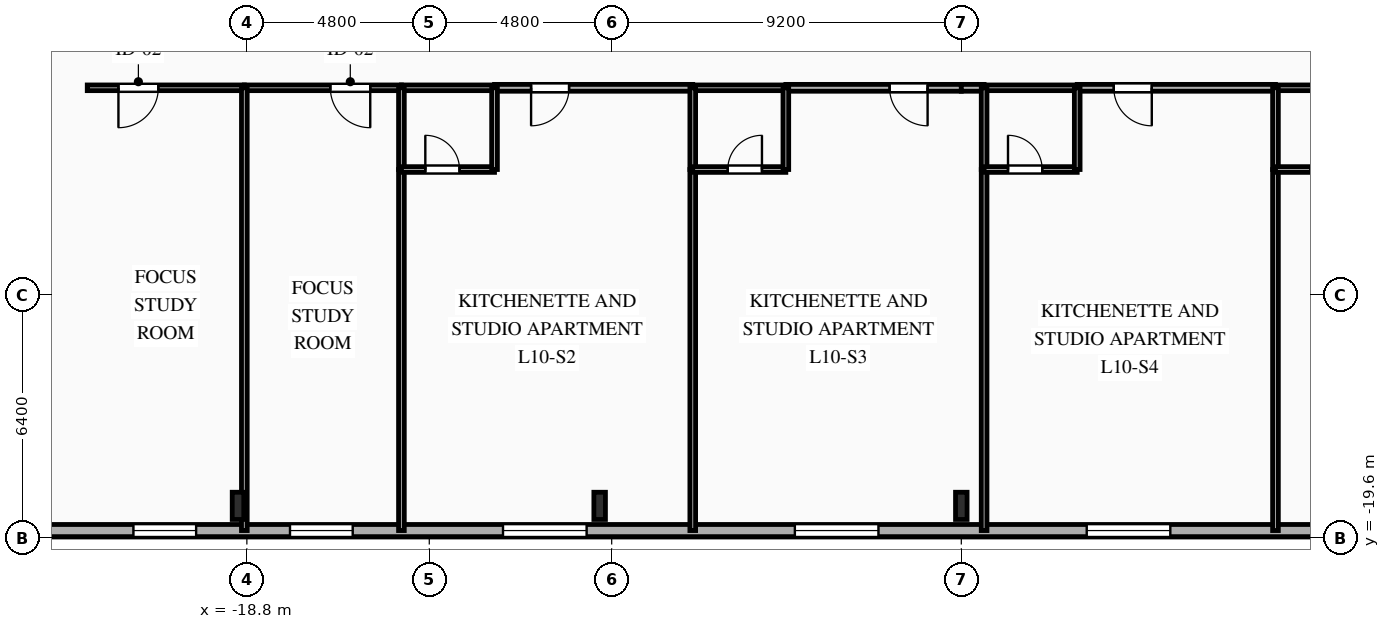
"""IFC4 building model, lengths in metres.
Left out: names, types, materials, properties, quantities, classifications, styles, units other than length and angle.
Written with IfcOpenShell. Run it as: python <this file> out.ifc"""

import sys

from ifc_helpers import new_model, si_unit, direction, frame, frame_2d, origin, origin_2d, place, context, subcontext, project, spatial, rectangle, i_section, extrude, element, fill, save


model = new_model("IFC4")
c1 = context("Model", 3, precision=1e-05, world=origin(), true_north=direction((0.0, 1.0)))
c2 = subcontext(c1, "Body", "Model", "MODEL_VIEW")
j1 = project(units=[si_unit("LENGTHUNIT", "METRE"), si_unit("PLANEANGLEUNIT", "RADIAN")], contexts=[c1])
p1 = place(None, origin())
s1 = spatial("IfcSite", under=j1, at=p1, CompositionType="ELEMENT")
p2 = place(p1, origin())
s2 = spatial("IfcBuilding", under=s1, at=p2, CompositionType="ELEMENT")
p3 = place(p2, frame((0.0, 0.0, 40.4)))
s3 = spatial("IfcBuildingStorey", under=s2, at=p3, CompositionType="ELEMENT", Elevation=40.4)
for number, where, z_axis, x_axis in (
    (1, (-19.033, -18.75, 0.0), (0.0, 0.0, 1.0), (1.0, 0.0, 0.0)),
    (2, (-9.517, -18.75, 0.0), (0.0, 0.0, 1.0), (1.0, 0.0, 0.0)),
    (3, (0.0, -18.75, 0.0), (0.0, 0.0, 1.0), (1.0, 0.0, 0.0)),
):
    element("IfcColumn", number, at=place(p3, frame(where, z_axis=z_axis, x_axis=x_axis)), inside=s3, PredefinedType="COLUMN", context=c2, shape_type="SweptSolid", body=[
        extrude(i_section(OverallWidth=0.304, OverallDepth=0.716, WebThickness=0.021, FlangeThickness=0.04, FilletRadius=0.027, at=origin_2d()), origin(), (0.0, 0.0, 1.0), 3.35),
    ])
p4 = place(p3, frame((29.2, -19.4, 0.0), z_axis=(0.0, 0.0, 1.0), x_axis=(-1.0, 0.0, 0.0)))
e4 = element("IfcWall", 4, at=p4, inside=s3, PredefinedType="SOLIDWALL", context=c2, shape_type="SweptSolid", body=[
    extrude(rectangle(XDim=58.4, YDim=0.32, at=frame_2d((29.2, 0.0))), origin(), (0.0, 0.0, 1.0), 3.035),
])
p5 = place(p4, frame((3.055, 0.0, 0.85)))
e5 = element("IfcOpeningElement", 5, at=p5, cuts=e4, PredefinedType="OPENING", context=c2, shape_type="SweptSolid", body=[
    extrude(rectangle(XDim=1.65, YDim=1.85, at=frame_2d((0.825, 0.925))), frame((0.0, 0.17, 0.0), z_axis=(0.0, -1.0, 0.0), x_axis=(1.0, 0.0, 0.0)), (0.0, 0.0, 1.0), 0.34),
])
p6 = place(p4, frame((7.175, 0.0, 0.85)))
e6 = element("IfcOpeningElement", 6, at=p6, cuts=e4, PredefinedType="OPENING", context=c2, shape_type="SweptSolid", body=[
    extrude(rectangle(XDim=1.65, YDim=1.85, at=frame_2d((0.825, 0.925))), frame((0.0, 0.17, 0.0), z_axis=(0.0, -1.0, 0.0), x_axis=(1.0, 0.0, 0.0)), (0.0, 0.0, 1.0), 0.34),
])
p7 = place(p4, frame((10.695, 0.0, 0.85)))
e7 = element("IfcOpeningElement", 7, at=p7, cuts=e4, PredefinedType="OPENING", context=c2, shape_type="SweptSolid", body=[
    extrude(rectangle(XDim=1.65, YDim=1.85, at=frame_2d((0.825, 0.925))), frame((0.0, 0.17, 0.0), z_axis=(0.0, -1.0, 0.0), x_axis=(1.0, 0.0, 0.0)), (0.0, 0.0, 1.0), 0.34),
])
p8 = place(p4, frame((16.02, 0.0, 0.85)))
e8 = element("IfcOpeningElement", 8, at=p8, cuts=e4, PredefinedType="OPENING", context=c2, shape_type="SweptSolid", body=[
    extrude(rectangle(XDim=2.2, YDim=1.85, at=frame_2d((1.1, 0.925))), frame((0.0, 0.17, 0.0), z_axis=(0.0, -1.0, 0.0), x_axis=(1.0, 0.0, 0.0)), (0.0, 0.0, 1.0), 0.34),
])
p9 = place(p4, frame((23.7, 0.0, 0.85)))
e9 = element("IfcOpeningElement", 9, at=p9, cuts=e4, PredefinedType="OPENING", context=c2, shape_type="SweptSolid", body=[
    extrude(rectangle(XDim=2.2, YDim=1.85, at=frame_2d((1.1, 0.925))), frame((0.0, 0.17, 0.0), z_axis=(0.0, -1.0, 0.0), x_axis=(1.0, 0.0, 0.0)), (0.0, 0.0, 1.0), 0.34),
])
p10 = place(p4, frame((31.38, 0.0, 0.85)))
e10 = element("IfcOpeningElement", 10, at=p10, cuts=e4, PredefinedType="OPENING", context=c2, shape_type="SweptSolid", body=[
    extrude(rectangle(XDim=2.2, YDim=1.85, at=frame_2d((1.1, 0.925))), frame((0.0, 0.17, 0.0), z_axis=(0.0, -1.0, 0.0), x_axis=(1.0, 0.0, 0.0)), (0.0, 0.0, 1.0), 0.34),
])
p11 = place(p4, frame((39.06, 0.0, 0.85)))
e11 = element("IfcOpeningElement", 11, at=p11, cuts=e4, PredefinedType="OPENING", context=c2, shape_type="SweptSolid", body=[
    extrude(rectangle(XDim=2.2, YDim=1.85, at=frame_2d((1.1, 0.925))), frame((0.0, 0.17, 0.0), z_axis=(0.0, -1.0, 0.0), x_axis=(1.0, 0.0, 0.0)), (0.0, 0.0, 1.0), 0.34),
])
p12 = place(p4, frame((45.215, 0.0, 0.85)))
e12 = element("IfcOpeningElement", 12, at=p12, cuts=e4, PredefinedType="OPENING", context=c2, shape_type="SweptSolid", body=[
    extrude(rectangle(XDim=1.65, YDim=1.85, at=frame_2d((0.825, 0.925))), frame((0.0, 0.17, 0.0), z_axis=(0.0, -1.0, 0.0), x_axis=(1.0, 0.0, 0.0)), (0.0, 0.0, 1.0), 0.34),
])
p13 = place(p4, frame((49.335, 0.0, 0.85)))
e13 = element("IfcOpeningElement", 13, at=p13, cuts=e4, PredefinedType="OPENING", context=c2, shape_type="SweptSolid", body=[
    extrude(rectangle(XDim=1.65, YDim=1.85, at=frame_2d((0.825, 0.925))), frame((0.0, 0.17, 0.0), z_axis=(0.0, -1.0, 0.0), x_axis=(1.0, 0.0, 0.0)), (0.0, 0.0, 1.0), 0.34),
])
p14 = place(p3, frame((-18.866, -7.75, 0.0), z_axis=(0.0, 0.0, 1.0), x_axis=(-1.0, 0.0, 0.0)))
e14 = element("IfcWall", 14, at=p14, inside=s3, PredefinedType="PARTITIONING", context=c2, shape_type="SweptSolid", body=[
    extrude(rectangle(XDim=4.134, YDim=0.15, at=frame_2d((2.067, 0.0))), origin(), (0.0, 0.0, 1.0), 3.035),
])
p15 = place(p14, frame((2.263, 0.0, 0.0)))
e15 = element("IfcOpeningElement", 15, at=p15, cuts=e14, PredefinedType="OPENING", context=c2, shape_type="SweptSolid", body=[
    extrude(rectangle(XDim=1.05, YDim=2.15, at=frame_2d((0.525, 1.075))), frame((0.0, 0.085, 0.0), z_axis=(0.0, -1.0, 0.0), x_axis=(1.0, 0.0, 0.0)), (0.0, 0.0, 1.0), 0.17),
])
p16 = place(p3, frame((-14.733, -7.75, 0.0), z_axis=(0.0, 0.0, 1.0), x_axis=(-1.0, 0.0, 0.0)))
e16 = element("IfcWall", 16, at=p16, inside=s3, PredefinedType="PARTITIONING", context=c2, shape_type="SweptSolid", body=[
    extrude(rectangle(XDim=4.134, YDim=0.15, at=frame_2d((2.067, 0.0))), origin(), (0.0, 0.0, 1.0), 3.035),
])
p17 = place(p16, frame((0.82, 0.0, 0.0)))
e17 = element("IfcOpeningElement", 17, at=p17, cuts=e16, PredefinedType="OPENING", context=c2, shape_type="SweptSolid", body=[
    extrude(rectangle(XDim=1.05, YDim=2.15, at=frame_2d((0.525, 1.075))), frame((0.0, 0.085, 0.0), z_axis=(0.0, -1.0, 0.0), x_axis=(1.0, 0.0, 0.0)), (0.0, 0.0, 1.0), 0.17),
])
p18 = place(p3, frame((-7.067, -7.75, 0.0), z_axis=(0.0, 0.0, 1.0), x_axis=(-1.0, 0.0, 0.0)))
e18 = element("IfcWall", 18, at=p18, inside=s3, PredefinedType="PARTITIONING", context=c2, shape_type="SweptSolid", body=[
    extrude(rectangle(XDim=5.216, YDim=0.18, at=frame_2d((2.608, 0.0))), origin(), (0.0, 0.0, 1.0), 3.035),
])
p19 = place(p18, frame((3.254, 0.0, 0.0)))
e19 = element("IfcOpeningElement", 19, at=p19, cuts=e18, PredefinedType="OPENING", context=c2, shape_type="SweptSolid", body=[
    extrude(rectangle(XDim=1.0, YDim=2.15, at=frame_2d((0.5, 1.075))), frame((0.0, 0.1, 0.0), z_axis=(0.0, -1.0, 0.0), x_axis=(1.0, 0.0, 0.0)), (0.0, 0.0, 1.0), 0.2),
])
p20 = place(p3, frame((-12.283, -7.75, 0.0), z_axis=(0.0, 0.0, 1.0), x_axis=(-1.0, 0.0, 0.0)))
e20 = element("IfcWall", 20, at=p20, inside=s3, PredefinedType="PLUMBINGWALL", context=c2, shape_type="SweptSolid", body=[
    extrude(rectangle(XDim=2.45, YDim=0.15, at=frame_2d((1.225, 0.0))), origin(), (0.0, 0.0, 1.0), 3.035),
])
p21 = place(p3, frame((0.0, -7.75, 0.0), z_axis=(0.0, 0.0, 1.0), x_axis=(-1.0, 0.0, 0.0)))
e21 = element("IfcWall", 21, at=p21, inside=s3, PredefinedType="PARTITIONING", context=c2, shape_type="SweptSolid", body=[
    extrude(rectangle(XDim=4.617, YDim=0.18, at=frame_2d((2.309, 0.0))), origin(), (0.0, 0.0, 1.0), 3.035),
])
p22 = place(p21, frame((0.887, 0.0, 0.0)))
e22 = element("IfcOpeningElement", 22, at=p22, cuts=e21, PredefinedType="OPENING", context=c2, shape_type="SweptSolid", body=[
    extrude(rectangle(XDim=1.0, YDim=2.15, at=frame_2d((0.5, 1.075))), frame((0.0, 0.1, 0.0), z_axis=(0.0, -1.0, 0.0), x_axis=(1.0, 0.0, 0.0)), (0.0, 0.0, 1.0), 0.2),
])
p23 = place(p3, frame((-4.617, -7.75, 0.0), z_axis=(0.0, 0.0, 1.0), x_axis=(-1.0, 0.0, 0.0)))
e23 = element("IfcWall", 23, at=p23, inside=s3, PredefinedType="PLUMBINGWALL", context=c2, shape_type="SweptSolid", body=[
    extrude(rectangle(XDim=2.45, YDim=0.15, at=frame_2d((1.225, 0.0))), origin(), (0.0, 0.0, 1.0), 3.035),
])
p24 = place(p3, frame((0.6, -7.75, 0.0), z_axis=(0.0, 0.0, 1.0), x_axis=(-1.0, 0.0, 0.0)))
e24 = element("IfcWall", 24, at=p24, inside=s3, PredefinedType="PARTITIONING", context=c2, shape_type="SweptSolid", body=[
    extrude(rectangle(XDim=0.6, YDim=0.18, at=frame_2d((0.3, 0.0))), origin(), (0.0, 0.0, 1.0), 3.035),
])
p25 = place(p3, frame((8.267, -7.75, 0.0), z_axis=(0.0, 0.0, 1.0), x_axis=(-1.0, 0.0, 0.0)))
e25 = element("IfcWall", 25, at=p25, inside=s3, PredefinedType="PARTITIONING", context=c2, shape_type="SweptSolid", body=[
    extrude(rectangle(XDim=5.217, YDim=0.18, at=frame_2d((2.608, 0.0))), origin(), (0.0, 0.0, 1.0), 3.035),
])
p26 = place(p25, frame((3.255, 0.0, 0.0)))
e26 = element("IfcOpeningElement", 26, at=p26, cuts=e25, PredefinedType="OPENING", context=c2, shape_type="SweptSolid", body=[
    extrude(rectangle(XDim=1.0, YDim=2.15, at=frame_2d((0.5, 1.075))), frame((0.0, 0.1, 0.0), z_axis=(0.0, -1.0, 0.0), x_axis=(1.0, 0.0, 0.0)), (0.0, 0.0, 1.0), 0.2),
])
for number, where, z_axis, x_axis in (
    (27, (3.05, -7.75, 0.0), (0.0, 0.0, 1.0), (-1.0, 0.0, 0.0)),
    (28, (10.717, -7.75, 0.0), (0.0, 0.0, 1.0), (-1.0, 0.0, 0.0)),
):
    element("IfcWall", number, at=place(p3, frame(where, z_axis=z_axis, x_axis=x_axis)), inside=s3, PredefinedType="PLUMBINGWALL", context=c2, shape_type="SweptSolid", body=[
        extrude(rectangle(XDim=2.45, YDim=0.15, at=frame_2d((1.225, 0.0))), origin(), (0.0, 0.0, 1.0), 3.035),
    ])
p27 = place(p3, frame((-18.866, -7.75, 0.0), z_axis=(0.0, 0.0, 1.0), x_axis=(0.0, -1.0, 0.0)))
e29 = element("IfcWall", 29, at=p27, inside=s3, PredefinedType="PARTITIONING", context=c2, shape_type="SweptSolid", body=[
    extrude(rectangle(XDim=11.65, YDim=0.15, at=frame_2d((5.825, 0.0))), origin(), (0.0, 0.0, 1.0), 2.52),
])
p28 = place(p3, frame((-14.733, -9.9, 0.0), z_axis=(0.0, 0.0, 1.0), x_axis=(0.0, -1.0, 0.0)))
e30 = element("IfcWall", 30, at=p28, inside=s3, PredefinedType="PARTITIONING", context=c2, shape_type="SweptSolid", body=[
    extrude(rectangle(XDim=9.5, YDim=0.15, at=frame_2d((4.75, 0.0))), origin(), (0.0, 0.0, 1.0), 3.035),
])
p29 = place(p3, frame((-14.733, -7.75, 0.0), z_axis=(0.0, 0.0, 1.0), x_axis=(0.0, -1.0, 0.0)))
e31 = element("IfcWall", 31, at=p29, inside=s3, PredefinedType="PLUMBINGWALL", context=c2, shape_type="SweptSolid", body=[
    extrude(rectangle(XDim=2.15, YDim=0.15, at=frame_2d((1.075, 0.0))), origin(), (0.0, 0.0, 1.0), 3.035),
])
p30 = place(p3, frame((-14.733, -9.9, 0.0), z_axis=(0.0, 0.0, 1.0), x_axis=(1.0, 0.0, 0.0)))
e32 = element("IfcWall", 32, at=p30, inside=s3, PredefinedType="PLUMBINGWALL", context=c2, shape_type="SweptSolid", body=[
    extrude(rectangle(XDim=2.45, YDim=0.15, at=frame_2d((1.225, 0.0))), origin(), (0.0, 0.0, 1.0), 3.035),
])
p31 = place(p30, frame((0.629, 0.0, 0.0)))
e33 = element("IfcOpeningElement", 33, at=p31, cuts=e32, PredefinedType="OPENING", context=c2, shape_type="SweptSolid", body=[
    extrude(rectangle(XDim=0.9, YDim=2.1, at=frame_2d((0.45, 1.05))), frame((0.0, 0.085, 0.0), z_axis=(0.0, -1.0, 0.0), x_axis=(1.0, 0.0, 0.0)), (0.0, 0.0, 1.0), 0.17),
])
p32 = place(p3, frame((-12.283, -9.9, 0.0), z_axis=(0.0, 0.0, 1.0), x_axis=(0.0, 1.0, 0.0)))
e34 = element("IfcWall", 34, at=p32, inside=s3, PredefinedType="PLUMBINGWALL", context=c2, shape_type="SweptSolid", body=[
    extrude(rectangle(XDim=2.15, YDim=0.15, at=frame_2d((1.075, 0.0))), origin(), (0.0, 0.0, 1.0), 3.035),
])
p33 = place(p3, frame((-7.067, -9.9, 0.0), z_axis=(0.0, 0.0, 1.0), x_axis=(0.0, -1.0, 0.0)))
e35 = element("IfcWall", 35, at=p33, inside=s3, PredefinedType="PARTITIONING", context=c2, shape_type="SweptSolid", body=[
    extrude(rectangle(XDim=9.5, YDim=0.15, at=frame_2d((4.75, 0.0))), origin(), (0.0, 0.0, 1.0), 3.035),
])
p34 = place(p3, frame((-7.067, -7.75, 0.0), z_axis=(0.0, 0.0, 1.0), x_axis=(0.0, -1.0, 0.0)))
e36 = element("IfcWall", 36, at=p34, inside=s3, PredefinedType="PLUMBINGWALL", context=c2, shape_type="SweptSolid", body=[
    extrude(rectangle(XDim=2.15, YDim=0.15, at=frame_2d((1.075, 0.0))), origin(), (0.0, 0.0, 1.0), 3.035),
])
p35 = place(p3, frame((-7.067, -9.9, 0.0), z_axis=(0.0, 0.0, 1.0), x_axis=(1.0, 0.0, 0.0)))
e37 = element("IfcWall", 37, at=p35, inside=s3, PredefinedType="PLUMBINGWALL", context=c2, shape_type="SweptSolid", body=[
    extrude(rectangle(XDim=2.45, YDim=0.15, at=frame_2d((1.225, 0.0))), origin(), (0.0, 0.0, 1.0), 3.035),
])
p36 = place(p35, frame((0.921, 0.0, 0.0)))
e38 = element("IfcOpeningElement", 38, at=p36, cuts=e37, PredefinedType="OPENING", context=c2, shape_type="SweptSolid", body=[
    extrude(rectangle(XDim=0.9, YDim=2.1, at=frame_2d((0.45, 1.05))), frame((0.0, 0.085, 0.0), z_axis=(0.0, -1.0, 0.0), x_axis=(1.0, 0.0, 0.0)), (0.0, 0.0, 1.0), 0.17),
])
p37 = place(p3, frame((-4.617, -9.9, 0.0), z_axis=(0.0, 0.0, 1.0), x_axis=(0.0, 1.0, 0.0)))
e39 = element("IfcWall", 39, at=p37, inside=s3, PredefinedType="PLUMBINGWALL", context=c2, shape_type="SweptSolid", body=[
    extrude(rectangle(XDim=2.15, YDim=0.15, at=frame_2d((1.075, 0.0))), origin(), (0.0, 0.0, 1.0), 3.035),
])
p38 = place(p3, frame((0.6, -9.9, 0.0), z_axis=(0.0, 0.0, 1.0), x_axis=(0.0, -1.0, 0.0)))
e40 = element("IfcWall", 40, at=p38, inside=s3, PredefinedType="PARTITIONING", context=c2, shape_type="SweptSolid", body=[
    extrude(rectangle(XDim=9.5, YDim=0.15, at=frame_2d((4.75, 0.0))), origin(), (0.0, 0.0, 1.0), 3.035),
])
p39 = place(p3, frame((0.6, -7.75, 0.0), z_axis=(0.0, 0.0, 1.0), x_axis=(0.0, -1.0, 0.0)))
e41 = element("IfcWall", 41, at=p39, inside=s3, PredefinedType="PLUMBINGWALL", context=c2, shape_type="SweptSolid", body=[
    extrude(rectangle(XDim=2.15, YDim=0.15, at=frame_2d((1.075, 0.0))), origin(), (0.0, 0.0, 1.0), 3.035),
])
p40 = place(p3, frame((0.6, -9.9, 0.0), z_axis=(0.0, 0.0, 1.0), x_axis=(1.0, 0.0, 0.0)))
e42 = element("IfcWall", 42, at=p40, inside=s3, PredefinedType="PLUMBINGWALL", context=c2, shape_type="SweptSolid", body=[
    extrude(rectangle(XDim=2.45, YDim=0.15, at=frame_2d((1.225, 0.0))), origin(), (0.0, 0.0, 1.0), 3.035),
])
p41 = place(p40, frame((0.629, 0.0, 0.0)))
e43 = element("IfcOpeningElement", 43, at=p41, cuts=e42, PredefinedType="OPENING", context=c2, shape_type="SweptSolid", body=[
    extrude(rectangle(XDim=0.9, YDim=2.1, at=frame_2d((0.45, 1.05))), frame((0.0, 0.085, 0.0), z_axis=(0.0, -1.0, 0.0), x_axis=(1.0, 0.0, 0.0)), (0.0, 0.0, 1.0), 0.17),
])
p42 = place(p3, frame((3.05, -9.9, 0.0), z_axis=(0.0, 0.0, 1.0), x_axis=(0.0, 1.0, 0.0)))
e44 = element("IfcWall", 44, at=p42, inside=s3, PredefinedType="PLUMBINGWALL", context=c2, shape_type="SweptSolid", body=[
    extrude(rectangle(XDim=2.15, YDim=0.15, at=frame_2d((1.075, 0.0))), origin(), (0.0, 0.0, 1.0), 3.035),
])
p43 = place(p3, frame((8.267, -9.9, 0.0), z_axis=(0.0, 0.0, 1.0), x_axis=(0.0, -1.0, 0.0)))
e45 = element("IfcWall", 45, at=p43, inside=s3, PredefinedType="PARTITIONING", context=c2, shape_type="SweptSolid", body=[
    extrude(rectangle(XDim=9.5, YDim=0.15, at=frame_2d((4.75, 0.0))), origin(), (0.0, 0.0, 1.0), 3.035),
])
p44 = place(p3, frame((8.267, -7.75, 0.0), z_axis=(0.0, 0.0, 1.0), x_axis=(0.0, -1.0, 0.0)))
e46 = element("IfcWall", 46, at=p44, inside=s3, PredefinedType="PLUMBINGWALL", context=c2, shape_type="SweptSolid", body=[
    extrude(rectangle(XDim=2.15, YDim=0.15, at=frame_2d((1.075, 0.0))), origin(), (0.0, 0.0, 1.0), 3.035),
])
p45 = place(p3, frame((8.267, -9.9, 0.0), z_axis=(0.0, 0.0, 1.0), x_axis=(1.0, 0.0, 0.0)))
e47 = element("IfcWall", 47, at=p45, inside=s3, PredefinedType="PLUMBINGWALL", context=c2, shape_type="SweptSolid", body=[
    extrude(rectangle(XDim=2.45, YDim=0.15, at=frame_2d((1.225, 0.0))), origin(), (0.0, 0.0, 1.0), 3.035),
])
p46 = place(p45, frame((0.921, 0.0, 0.0)))
e48 = element("IfcOpeningElement", 48, at=p46, cuts=e47, PredefinedType="OPENING", context=c2, shape_type="SweptSolid", body=[
    extrude(rectangle(XDim=0.9, YDim=2.1, at=frame_2d((0.45, 1.05))), frame((0.0, 0.085, 0.0), z_axis=(0.0, -1.0, 0.0), x_axis=(1.0, 0.0, 0.0)), (0.0, 0.0, 1.0), 0.17),
])
p47 = place(p9, origin())
e49 = element("IfcWindow", 49, at=p47, inside=s3, PartitioningType="SINGLE_PANEL", PredefinedType="WINDOW", context=c2, shape_type="SweptSolid", body=[
    extrude(rectangle(XDim=2.2, YDim=1.85, at=frame_2d((1.1, 0.925))), frame((0.0, 0.03, 0.0), z_axis=(0.0, -1.0, 0.0), x_axis=(1.0, 0.0, 0.0)), (0.0, 0.0, 1.0), 0.06),
])
fill(e9, e49)
p48 = place(p10, origin())
e50 = element("IfcWindow", 50, at=p48, inside=s3, PartitioningType="SINGLE_PANEL", PredefinedType="WINDOW", context=c2, shape_type="SweptSolid", body=[
    extrude(rectangle(XDim=2.2, YDim=1.85, at=frame_2d((1.1, 0.925))), frame((0.0, 0.03, 0.0), z_axis=(0.0, -1.0, 0.0), x_axis=(1.0, 0.0, 0.0)), (0.0, 0.0, 1.0), 0.06),
])
fill(e10, e50)
p49 = place(p11, origin())
e51 = element("IfcWindow", 51, at=p49, inside=s3, PartitioningType="SINGLE_PANEL", PredefinedType="WINDOW", context=c2, shape_type="SweptSolid", body=[
    extrude(rectangle(XDim=2.2, YDim=1.85, at=frame_2d((1.1, 0.925))), frame((0.0, 0.03, 0.0), z_axis=(0.0, -1.0, 0.0), x_axis=(1.0, 0.0, 0.0)), (0.0, 0.0, 1.0), 0.06),
])
fill(e11, e51)
p50 = place(p12, origin())
e52 = element("IfcWindow", 52, at=p50, inside=s3, PartitioningType="SINGLE_PANEL", PredefinedType="WINDOW", context=c2, shape_type="SweptSolid", body=[
    extrude(rectangle(XDim=1.65, YDim=1.85, at=frame_2d((0.825, 0.925))), frame((0.0, 0.03, 0.0), z_axis=(0.0, -1.0, 0.0), x_axis=(1.0, 0.0, 0.0)), (0.0, 0.0, 1.0), 0.06),
])
fill(e12, e52)
p51 = place(p13, origin())
e53 = element("IfcWindow", 53, at=p51, inside=s3, PartitioningType="SINGLE_PANEL", PredefinedType="WINDOW", context=c2, shape_type="SweptSolid", body=[
    extrude(rectangle(XDim=1.65, YDim=1.85, at=frame_2d((0.825, 0.925))), frame((0.0, 0.03, 0.0), z_axis=(0.0, -1.0, 0.0), x_axis=(1.0, 0.0, 0.0)), (0.0, 0.0, 1.0), 0.06),
])
fill(e13, e53)
p52 = place(p15, origin())
e54 = element("IfcDoor", 54, at=p52, inside=s3, OperationType="SINGLE_SWING_RIGHT", PredefinedType="DOOR", context=c2, shape_type="SweptSolid", body=[
    extrude(rectangle(XDim=1.05, YDim=2.15, at=frame_2d((0.525, 1.075))), frame((0.0, 0.025, 0.0), z_axis=(0.0, -1.0, 0.0), x_axis=(1.0, 0.0, 0.0)), (0.0, 0.0, 1.0), 0.05),
])
fill(e15, e54)
p53 = place(p17, origin())
e55 = element("IfcDoor", 55, at=p53, inside=s3, OperationType="SINGLE_SWING_LEFT", PredefinedType="DOOR", context=c2, shape_type="SweptSolid", body=[
    extrude(rectangle(XDim=1.05, YDim=2.15, at=frame_2d((0.525, 1.075))), frame((0.0, 0.025, 0.0), z_axis=(0.0, -1.0, 0.0), x_axis=(1.0, 0.0, 0.0)), (0.0, 0.0, 1.0), 0.05),
])
fill(e17, e55)
p54 = place(p19, origin())
e56 = element("IfcDoor", 56, at=p54, inside=s3, OperationType="SINGLE_SWING_RIGHT", PredefinedType="DOOR", context=c2, shape_type="SweptSolid", body=[
    extrude(rectangle(XDim=1.0, YDim=2.15, at=frame_2d((0.5, 1.075))), frame((0.0, 0.025, 0.0), z_axis=(0.0, -1.0, 0.0), x_axis=(1.0, 0.0, 0.0)), (0.0, 0.0, 1.0), 0.05),
])
fill(e19, e56)
p55 = place(p22, origin())
e57 = element("IfcDoor", 57, at=p55, inside=s3, OperationType="SINGLE_SWING_LEFT", PredefinedType="DOOR", context=c2, shape_type="SweptSolid", body=[
    extrude(rectangle(XDim=1.0, YDim=2.15, at=frame_2d((0.5, 1.075))), frame((0.0, 0.025, 0.0), z_axis=(0.0, -1.0, 0.0), x_axis=(1.0, 0.0, 0.0)), (0.0, 0.0, 1.0), 0.05),
])
fill(e22, e57)
p56 = place(p26, origin())
e58 = element("IfcDoor", 58, at=p56, inside=s3, OperationType="SINGLE_SWING_LEFT", PredefinedType="DOOR", context=c2, shape_type="SweptSolid", body=[
    extrude(rectangle(XDim=1.0, YDim=2.15, at=frame_2d((0.5, 1.075))), frame((0.0, 0.025, 0.0), z_axis=(0.0, -1.0, 0.0), x_axis=(1.0, 0.0, 0.0)), (0.0, 0.0, 1.0), 0.05),
])
fill(e26, e58)
p57 = place(p31, origin())
e59 = element("IfcDoor", 59, at=p57, inside=s3, OperationType="SINGLE_SWING_LEFT", PredefinedType="DOOR", context=c2, shape_type="SweptSolid", body=[
    extrude(rectangle(XDim=0.9, YDim=2.1, at=frame_2d((0.45, 1.05))), frame((0.0, 0.025, 0.0), z_axis=(0.0, -1.0, 0.0), x_axis=(1.0, 0.0, 0.0)), (0.0, 0.0, 1.0), 0.05),
])
fill(e33, e59)
p58 = place(p36, origin())
e60 = element("IfcDoor", 60, at=p58, inside=s3, OperationType="SINGLE_SWING_RIGHT", PredefinedType="DOOR", context=c2, shape_type="SweptSolid", body=[
    extrude(rectangle(XDim=0.9, YDim=2.1, at=frame_2d((0.45, 1.05))), frame((0.0, 0.025, 0.0), z_axis=(0.0, -1.0, 0.0), x_axis=(1.0, 0.0, 0.0)), (0.0, 0.0, 1.0), 0.05),
])
fill(e38, e60)
p59 = place(p41, origin())
e61 = element("IfcDoor", 61, at=p59, inside=s3, OperationType="SINGLE_SWING_LEFT", PredefinedType="DOOR", context=c2, shape_type="SweptSolid", body=[
    extrude(rectangle(XDim=0.9, YDim=2.1, at=frame_2d((0.45, 1.05))), frame((0.0, 0.025, 0.0), z_axis=(0.0, -1.0, 0.0), x_axis=(1.0, 0.0, 0.0)), (0.0, 0.0, 1.0), 0.05),
])
fill(e43, e61)
p60 = place(p46, origin())
e62 = element("IfcDoor", 62, at=p60, inside=s3, OperationType="SINGLE_SWING_RIGHT", PredefinedType="DOOR", context=c2, shape_type="SweptSolid", body=[
    extrude(rectangle(XDim=0.9, YDim=2.1, at=frame_2d((0.45, 1.05))), frame((0.0, 0.025, 0.0), z_axis=(0.0, -1.0, 0.0), x_axis=(1.0, 0.0, 0.0)), (0.0, 0.0, 1.0), 0.05),
])
fill(e48, e62)
save(model, sys.argv[1])
